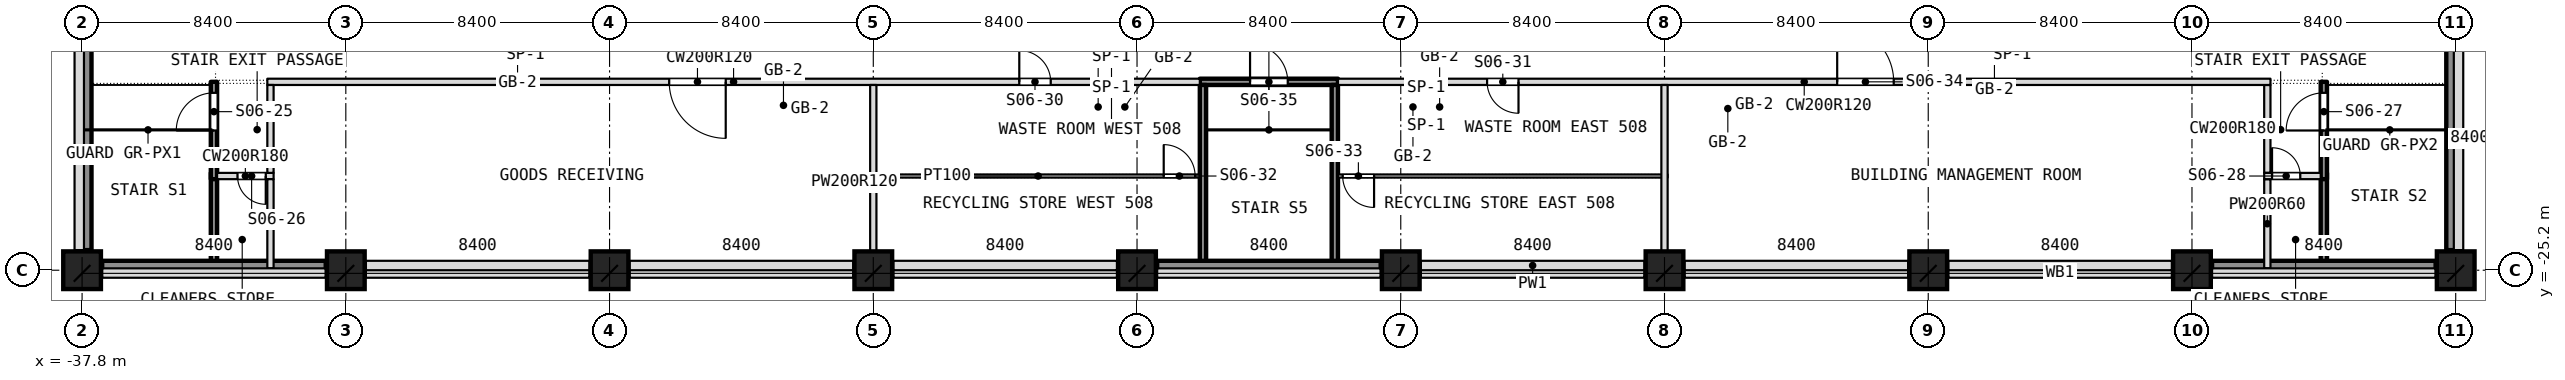
"""IFC4 building model, lengths in metres.
Left out: names, types, materials, properties, quantities, classifications, styles, units other than length and angle.
Written with IfcOpenShell. Run it as: python <this file> out.ifc"""

import sys

from ifc_helpers import new_model, si_unit, direction, frame, frame_2d, origin, origin_2d, place, context, subcontext, project, spatial, rectangle, extrude, element, fill, save


model = new_model("IFC4")
c1 = context("Model", 3, precision=1e-05, world=origin(), true_north=direction((0.0, 1.0)))
c2 = subcontext(c1, "Body", "Model", "MODEL_VIEW")
j1 = project(units=[si_unit("LENGTHUNIT", "METRE"), si_unit("PLANEANGLEUNIT", "RADIAN")], contexts=[c1])
p1 = place(None, origin())
s1 = spatial("IfcSite", under=j1, at=p1, CompositionType="ELEMENT")
p2 = place(p1, origin())
s2 = spatial("IfcBuilding", under=s1, at=p2, CompositionType="ELEMENT")
p3 = place(p2, frame((0.0, 0.0, 31.0)))
s3 = spatial("IfcBuildingStorey", under=s2, at=p3, CompositionType="ELEMENT", Elevation=31.0)
for number, where, z_axis, x_axis in (
    (1, (-37.8, -25.2, 0.0), (0.0, 0.0, 1.0), (1.0, 0.0, 0.0)),
    (2, (-29.4, -25.2, 0.0), (0.0, 0.0, 1.0), (1.0, 0.0, 0.0)),
    (3, (-21.0, -25.2, 0.0), (0.0, 0.0, 1.0), (1.0, 0.0, 0.0)),
    (4, (-12.6, -25.2, 0.0), (0.0, 0.0, 1.0), (1.0, 0.0, 0.0)),
    (5, (-4.2, -25.2, 0.0), (0.0, 0.0, 1.0), (1.0, 0.0, 0.0)),
    (6, (4.2, -25.2, 0.0), (0.0, 0.0, 1.0), (1.0, 0.0, 0.0)),
    (7, (12.6, -25.2, 0.0), (0.0, 0.0, 1.0), (1.0, 0.0, 0.0)),
    (8, (21.0, -25.2, 0.0), (0.0, 0.0, 1.0), (1.0, 0.0, 0.0)),
    (9, (29.4, -25.2, 0.0), (0.0, 0.0, 1.0), (1.0, 0.0, 0.0)),
    (10, (37.8, -25.2, 0.0), (0.0, 0.0, 1.0), (1.0, 0.0, 0.0)),
):
    element("IfcColumn", number, at=place(p3, frame(where, z_axis=z_axis, x_axis=x_axis)), inside=s3, PredefinedType="COLUMN", context=c2, shape_type="SweptSolid", body=[
        extrude(rectangle(XDim=1.2, YDim=1.2, at=origin_2d()), origin(), (0.0, 0.0, 1.0), 5.5),
    ])
p4 = place(p3, frame((33.6, -25.14, 0.0), z_axis=(0.0, 0.0, 1.0), x_axis=(0.0, 1.0, 0.0)))
e11 = element("IfcWall", 11, at=p4, inside=s3, PredefinedType="PARTITIONING", context=c2, shape_type="SweptSolid", body=[
    extrude(rectangle(XDim=3.04, YDim=0.2, at=frame_2d((1.52, 0.0))), origin(), (0.0, 0.0, 1.0), 5.35),
])
p5 = place(p3, frame((33.6, -22.3, 0.0), z_axis=(0.0, 0.0, 1.0), x_axis=(0.0, 1.0, 0.0)))
e12 = element("IfcWall", 12, at=p5, inside=s3, PredefinedType="PARTITIONING", context=c2, shape_type="SweptSolid", body=[
    extrude(rectangle(XDim=3.1, YDim=0.2, at=frame_2d((1.55, 0.0))), origin(), (0.0, 0.0, 1.0), 5.35),
])
p6 = place(p5, frame((1.55, 0.0, 0.0)))
e13 = element("IfcOpeningElement", 13, at=p6, cuts=e12, PredefinedType="OPENING", context=c2, shape_type="SweptSolid", body=[
    extrude(rectangle(XDim=1.2, YDim=2.1, at=frame_2d((0.6, 1.05))), frame((0.0, 0.1, 0.0), z_axis=(0.0, -1.0, 0.0), x_axis=(1.0, 0.0, 0.0)), (0.0, 0.0, 1.0), 0.2),
])
p7 = place(p3, frame((31.8, -25.14, 0.0), z_axis=(0.0, 0.0, 1.0), x_axis=(0.0, 1.0, 0.0)))
e14 = element("IfcWall", 14, at=p7, inside=s3, PredefinedType="PARTITIONING", context=c2, shape_type="SweptSolid", body=[
    extrude(rectangle(XDim=2.84, YDim=0.2, at=frame_2d((1.42, 0.0))), origin(), (0.0, 0.0, 1.0), 5.35),
])
p8 = place(p3, frame((31.8, -22.1, 0.0), z_axis=(0.0, 0.0, 1.0), x_axis=(0.0, 1.0, 0.0)))
e15 = element("IfcWall", 15, at=p8, inside=s3, PredefinedType="PARTITIONING", context=c2, shape_type="SweptSolid", body=[
    extrude(rectangle(XDim=2.8, YDim=0.2, at=frame_2d((1.4, 0.0))), origin(), (0.0, 0.0, 1.0), 5.35),
])
p9 = place(p3, frame((-33.5, -22.2, 0.0), z_axis=(0.0, 0.0, 1.0), x_axis=(1.0, 0.0, 0.0)))
e16 = element("IfcWall", 16, at=p9, inside=s3, PredefinedType="PARTITIONING", context=c2, shape_type="SweptSolid", body=[
    extrude(rectangle(XDim=1.8, YDim=0.2, at=frame_2d((0.9, 0.0))), origin(), (0.0, 0.0, 1.0), 5.35),
])
p10 = place(p9, frame((0.65, 0.0, 0.0)))
e17 = element("IfcOpeningElement", 17, at=p10, cuts=e16, PredefinedType="OPENING", context=c2, shape_type="SweptSolid", body=[
    extrude(rectangle(XDim=0.9, YDim=2.1, at=frame_2d((0.45, 1.05))), frame((0.0, 0.1, 0.0), z_axis=(0.0, -1.0, 0.0), x_axis=(1.0, 0.0, 0.0)), (0.0, 0.0, 1.0), 0.2),
])
p11 = place(p3, frame((31.7, -22.2, 0.0), z_axis=(0.0, 0.0, 1.0), x_axis=(1.0, 0.0, 0.0)))
e18 = element("IfcWall", 18, at=p11, inside=s3, PredefinedType="PARTITIONING", context=c2, shape_type="SweptSolid", body=[
    extrude(rectangle(XDim=1.8, YDim=0.2, at=frame_2d((0.9, 0.0))), origin(), (0.0, 0.0, 1.0), 5.35),
])
p12 = place(p11, frame((0.25, 0.0, 0.0)))
e19 = element("IfcOpeningElement", 19, at=p12, cuts=e18, PredefinedType="OPENING", context=c2, shape_type="SweptSolid", body=[
    extrude(rectangle(XDim=0.9, YDim=2.1, at=frame_2d((0.45, 1.05))), frame((0.0, 0.1, 0.0), z_axis=(0.0, -1.0, 0.0), x_axis=(1.0, 0.0, 0.0)), (0.0, 0.0, 1.0), 0.2),
])
p13 = place(p3, frame((-12.5, -22.2, 0.0), z_axis=(0.0, 0.0, 1.0), x_axis=(1.0, 0.0, 0.0)))
e20 = element("IfcWall", 20, at=p13, inside=s3, PredefinedType="PARTITIONING", context=c2, shape_type="SweptSolid", body=[
    extrude(rectangle(XDim=10.3, YDim=0.1, at=frame_2d((5.15, 0.0))), origin(), (0.0, 0.0, 1.0), 5.35),
])
p14 = place(p13, frame((9.15, 0.0, 0.0)))
e21 = element("IfcOpeningElement", 21, at=p14, cuts=e20, PredefinedType="OPENING", context=c2, shape_type="SweptSolid", body=[
    extrude(rectangle(XDim=1.0, YDim=2.1, at=frame_2d((0.5, 1.05))), frame((0.0, 0.05, 0.0), z_axis=(0.0, -1.0, 0.0), x_axis=(1.0, 0.0, 0.0)), (0.0, 0.0, 1.0), 0.1),
])
p15 = place(p3, frame((2.2, -22.2, 0.0), z_axis=(0.0, 0.0, 1.0), x_axis=(1.0, 0.0, 0.0)))
e22 = element("IfcWall", 22, at=p15, inside=s3, PredefinedType="PARTITIONING", context=c2, shape_type="SweptSolid", body=[
    extrude(rectangle(XDim=10.5, YDim=0.1, at=frame_2d((5.25, 0.0))), origin(), (0.0, 0.0, 1.0), 5.35),
])
p16 = place(p15, frame((0.15, 0.0, 0.0)))
e23 = element("IfcOpeningElement", 23, at=p16, cuts=e22, PredefinedType="OPENING", context=c2, shape_type="SweptSolid", body=[
    extrude(rectangle(XDim=1.0, YDim=2.1, at=frame_2d((0.5, 1.05))), frame((0.0, 0.05, 0.0), z_axis=(0.0, -1.0, 0.0), x_axis=(1.0, 0.0, 0.0)), (0.0, 0.0, 1.0), 0.1),
])
p17 = place(p3, frame((-31.9, -19.2, 0.0), z_axis=(0.0, 0.0, 1.0), x_axis=(1.0, 0.0, 0.0)))
e24 = element("IfcWall", 24, at=p17, inside=s3, PredefinedType="PARTITIONING", context=c2, shape_type="SweptSolid", body=[
    extrude(rectangle(XDim=29.7, YDim=0.2, at=frame_2d((14.85, 0.0))), origin(), (0.0, 0.0, 1.0), 3.7),
])
p18 = place(p17, frame((12.8, 0.0, 0.0)))
e25 = element("IfcOpeningElement", 25, at=p18, cuts=e24, PredefinedType="OPENING", context=c2, shape_type="SweptSolid", body=[
    extrude(rectangle(XDim=1.8, YDim=2.1, at=frame_2d((0.9, 1.05))), frame((0.0, 0.1, 0.0), z_axis=(0.0, -1.0, 0.0), x_axis=(1.0, 0.0, 0.0)), (0.0, 0.0, 1.0), 0.2),
])
p19 = place(p17, frame((23.95, 0.0, 0.0)))
e26 = element("IfcOpeningElement", 26, at=p19, cuts=e24, PredefinedType="OPENING", context=c2, shape_type="SweptSolid", body=[
    extrude(rectangle(XDim=1.0, YDim=2.1, at=frame_2d((0.5, 1.05))), frame((0.0, 0.1, 0.0), z_axis=(0.0, -1.0, 0.0), x_axis=(1.0, 0.0, 0.0)), (0.0, 0.0, 1.0), 0.2),
])
p20 = place(p3, frame((2.2, -19.2, 0.0), z_axis=(0.0, 0.0, 1.0), x_axis=(1.0, 0.0, 0.0)))
e27 = element("IfcWall", 27, at=p20, inside=s3, PredefinedType="PARTITIONING", context=c2, shape_type="SweptSolid", body=[
    extrude(rectangle(XDim=29.7, YDim=0.2, at=frame_2d((14.85, 0.0))), origin(), (0.0, 0.0, 1.0), 3.7),
])
p21 = place(p20, frame((4.75, 0.0, 0.0)))
e28 = element("IfcOpeningElement", 28, at=p21, cuts=e27, PredefinedType="OPENING", context=c2, shape_type="SweptSolid", body=[
    extrude(rectangle(XDim=1.0, YDim=2.1, at=frame_2d((0.5, 1.05))), frame((0.0, 0.1, 0.0), z_axis=(0.0, -1.0, 0.0), x_axis=(1.0, 0.0, 0.0)), (0.0, 0.0, 1.0), 0.2),
])
p22 = place(p20, frame((15.9, 0.0, 0.0)))
e29 = element("IfcOpeningElement", 29, at=p22, cuts=e27, PredefinedType="OPENING", context=c2, shape_type="SweptSolid", body=[
    extrude(rectangle(XDim=1.8, YDim=2.1, at=frame_2d((0.9, 1.05))), frame((0.0, 0.1, 0.0), z_axis=(0.0, -1.0, 0.0), x_axis=(1.0, 0.0, 0.0)), (0.0, 0.0, 1.0), 0.2),
])
p23 = place(p3, frame((-2.2, -19.2, 0.0), z_axis=(0.0, 0.0, 1.0), x_axis=(1.0, 0.0, 0.0)))
e30 = element("IfcWall", 30, at=p23, inside=s3, PredefinedType="PARTITIONING", context=c2, shape_type="SweptSolid", body=[
    extrude(rectangle(XDim=4.4, YDim=0.2, at=frame_2d((2.2, 0.0))), origin(), (0.0, 0.0, 1.0), 5.35),
])
p24 = place(p23, frame((1.6, 0.0, 0.0)))
e31 = element("IfcOpeningElement", 31, at=p24, cuts=e30, PredefinedType="OPENING", context=c2, shape_type="SweptSolid", body=[
    extrude(rectangle(XDim=1.2, YDim=2.1, at=frame_2d((0.6, 1.05))), frame((0.0, 0.1, 0.0), z_axis=(0.0, -1.0, 0.0), x_axis=(1.0, 0.0, 0.0)), (0.0, 0.0, 1.0), 0.2),
])
p25 = place(p3, frame((12.6, -25.5, 0.0), z_axis=(0.0, 0.0, 1.0), x_axis=(0.0, 1.0, 0.0)))
e32 = element("IfcWall", 32, at=p25, inside=s3, PredefinedType="PARTITIONING", context=c2, shape_type="SweptSolid", body=[
    extrude(rectangle(XDim=6.2, YDim=0.2, at=frame_2d((3.1, 0.0))), origin(), (0.0, 0.0, 1.0), 5.35),
])
for number, where, z_axis, x_axis in (
    (33, (2.1, -25.14, 0.0), (0.0, 0.0, 1.0), (0.0, 1.0, 0.0)),
    (34, (-2.1, -25.14, 0.0), (0.0, 0.0, 1.0), (0.0, 1.0, 0.0)),
):
    element("IfcWall", number, at=place(p3, frame(where, z_axis=z_axis, x_axis=x_axis)), inside=s3, PredefinedType="PARTITIONING", context=c2, shape_type="SweptSolid", body=[
        extrude(rectangle(XDim=5.84, YDim=0.2, at=frame_2d((2.92, 0.0))), origin(), (0.0, 0.0, 1.0), 5.35),
    ])
p26 = place(p3, frame((-12.6, -25.5, 0.0), z_axis=(0.0, 0.0, 1.0), x_axis=(0.0, 1.0, 0.0)))
e35 = element("IfcWall", 35, at=p26, inside=s3, PredefinedType="PARTITIONING", context=c2, shape_type="SweptSolid", body=[
    extrude(rectangle(XDim=6.2, YDim=0.2, at=frame_2d((3.1, 0.0))), origin(), (0.0, 0.0, 1.0), 5.35),
])
p27 = place(p3, frame((-31.8, -25.14, 0.0), z_axis=(0.0, 0.0, 1.0), x_axis=(0.0, 1.0, 0.0)))
e36 = element("IfcWall", 36, at=p27, inside=s3, PredefinedType="PARTITIONING", context=c2, shape_type="SweptSolid", body=[
    extrude(rectangle(XDim=2.84, YDim=0.2, at=frame_2d((1.42, 0.0))), origin(), (0.0, 0.0, 1.0), 5.35),
])
p28 = place(p3, frame((-31.8, -22.1, 0.0), z_axis=(0.0, 0.0, 1.0), x_axis=(0.0, 1.0, 0.0)))
e37 = element("IfcWall", 37, at=p28, inside=s3, PredefinedType="PARTITIONING", context=c2, shape_type="SweptSolid", body=[
    extrude(rectangle(XDim=2.8, YDim=0.2, at=frame_2d((1.4, 0.0))), origin(), (0.0, 0.0, 1.0), 5.35),
])
p29 = place(p3, frame((-33.6, -25.14, 0.0), z_axis=(0.0, 0.0, 1.0), x_axis=(0.0, 1.0, 0.0)))
e38 = element("IfcWall", 38, at=p29, inside=s3, PredefinedType="PARTITIONING", context=c2, shape_type="SweptSolid", body=[
    extrude(rectangle(XDim=3.04, YDim=0.2, at=frame_2d((1.52, 0.0))), origin(), (0.0, 0.0, 1.0), 5.35),
])
p30 = place(p3, frame((-33.6, -22.3, 0.0), z_axis=(0.0, 0.0, 1.0), x_axis=(0.0, 1.0, 0.0)))
e39 = element("IfcWall", 39, at=p30, inside=s3, PredefinedType="PARTITIONING", context=c2, shape_type="SweptSolid", body=[
    extrude(rectangle(XDim=3.1, YDim=0.2, at=frame_2d((1.55, 0.0))), origin(), (0.0, 0.0, 1.0), 5.35),
])
p31 = place(p30, frame((1.55, 0.0, 0.0)))
e40 = element("IfcOpeningElement", 40, at=p31, cuts=e39, PredefinedType="OPENING", context=c2, shape_type="SweptSolid", body=[
    extrude(rectangle(XDim=1.2, YDim=2.1, at=frame_2d((0.6, 1.05))), frame((0.0, 0.1, 0.0), z_axis=(0.0, -1.0, 0.0), x_axis=(1.0, 0.0, 0.0)), (0.0, 0.0, 1.0), 0.2),
])
p32 = place(p3, frame((-37.16, -25.29, 0.0), z_axis=(0.0, 0.0, 1.0), x_axis=(1.0, 0.0, 0.0)))
e41 = element("IfcWall", 41, at=p32, inside=s3, PredefinedType="NOTDEFINED", context=c2, shape_type="SweptSolid", body=[
    extrude(rectangle(XDim=7.12, YDim=0.3, at=frame_2d((3.56, 0.0))), origin(), (0.0, 0.0, 1.0), 4.18),
])
for number, where, z_axis, x_axis in (
    (42, (-28.76, -25.29, 0.0), (0.0, 0.0, 1.0), (1.0, 0.0, 0.0)),
    (43, (-20.36, -25.29, 0.0), (0.0, 0.0, 1.0), (1.0, 0.0, 0.0)),
):
    element("IfcWall", number, at=place(p3, frame(where, z_axis=z_axis, x_axis=x_axis)), inside=s3, PredefinedType="NOTDEFINED", context=c2, shape_type="SweptSolid", body=[
        extrude(rectangle(XDim=7.12, YDim=0.3, at=frame_2d((3.56, 0.0))), origin(), (0.0, 0.0, 1.0), 4.18),
    ])
p33 = place(p3, frame((-11.96, -25.29, 0.0), z_axis=(0.0, 0.0, 1.0), x_axis=(1.0, 0.0, 0.0)))
e44 = element("IfcWall", 44, at=p33, inside=s3, PredefinedType="NOTDEFINED", context=c2, shape_type="SweptSolid", body=[
    extrude(rectangle(XDim=7.12, YDim=0.3, at=frame_2d((3.56, 0.0))), origin(), (0.0, 0.0, 1.0), 4.18),
])
p34 = place(p3, frame((-3.56, -25.29, 0.0), z_axis=(0.0, 0.0, 1.0), x_axis=(1.0, 0.0, 0.0)))
e45 = element("IfcWall", 45, at=p34, inside=s3, PredefinedType="NOTDEFINED", context=c2, shape_type="SweptSolid", body=[
    extrude(rectangle(XDim=7.12, YDim=0.3, at=frame_2d((3.56, 0.0))), origin(), (0.0, 0.0, 1.0), 4.18),
])
p35 = place(p3, frame((4.84, -25.29, 0.0), z_axis=(0.0, 0.0, 1.0), x_axis=(1.0, 0.0, 0.0)))
e46 = element("IfcWall", 46, at=p35, inside=s3, PredefinedType="NOTDEFINED", context=c2, shape_type="SweptSolid", body=[
    extrude(rectangle(XDim=7.12, YDim=0.3, at=frame_2d((3.56, 0.0))), origin(), (0.0, 0.0, 1.0), 4.18),
])
for number, where, z_axis, x_axis in (
    (47, (13.24, -25.29, 0.0), (0.0, 0.0, 1.0), (1.0, 0.0, 0.0)),
    (48, (21.64, -25.29, 0.0), (0.0, 0.0, 1.0), (1.0, 0.0, 0.0)),
):
    element("IfcWall", number, at=place(p3, frame(where, z_axis=z_axis, x_axis=x_axis)), inside=s3, PredefinedType="NOTDEFINED", context=c2, shape_type="SweptSolid", body=[
        extrude(rectangle(XDim=7.12, YDim=0.3, at=frame_2d((3.56, 0.0))), origin(), (0.0, 0.0, 1.0), 4.18),
    ])
p36 = place(p3, frame((30.04, -25.29, 0.0), z_axis=(0.0, 0.0, 1.0), x_axis=(1.0, 0.0, 0.0)))
e49 = element("IfcWall", 49, at=p36, inside=s3, PredefinedType="NOTDEFINED", context=c2, shape_type="SweptSolid", body=[
    extrude(rectangle(XDim=7.12, YDim=0.3, at=frame_2d((3.56, 0.0))), origin(), (0.0, 0.0, 1.0), 4.18),
])
for number, where, z_axis, x_axis in (
    (50, (37.89, -24.56, 0.0), (0.0, 0.0, 1.0), (0.0, 1.0, 0.0)),
    (51, (-37.89, -17.44, 0.0), (0.0, 0.0, 1.0), (0.0, -1.0, 0.0)),
):
    element("IfcWall", number, at=place(p3, frame(where, z_axis=z_axis, x_axis=x_axis)), inside=s3, PredefinedType="NOTDEFINED", context=c2, shape_type="SweptSolid", body=[
        extrude(rectangle(XDim=7.12, YDim=0.3, at=frame_2d((3.56, 0.0))), origin(), (0.0, 0.0, 1.0), 4.18),
    ])
for number, where, z_axis, x_axis in (
    (52, (-37.65, -24.56, 5.5), (0.0, 0.0, 1.0), (0.0, 1.0, 0.0)),
    (53, (37.65, -17.44, 5.5), (0.0, 0.0, 1.0), (0.0, -1.0, 0.0)),
):
    element("IfcWall", number, at=place(p3, frame(where, z_axis=z_axis, x_axis=x_axis)), inside=s3, PredefinedType="PARAPET", context=c2, shape_type="SweptSolid", body=[
        extrude(rectangle(XDim=7.12, YDim=0.3, at=frame_2d((3.56, 0.0))), origin(), (0.0, 0.0, 1.0), 1.1),
    ])
p37 = place(p3, frame((37.16, -25.05, 5.5), z_axis=(0.0, 0.0, 1.0), x_axis=(-1.0, 0.0, 0.0)))
e54 = element("IfcWall", 54, at=p37, inside=s3, PredefinedType="PARAPET", context=c2, shape_type="SweptSolid", body=[
    extrude(rectangle(XDim=7.12, YDim=0.3, at=frame_2d((3.56, 0.0))), origin(), (0.0, 0.0, 1.0), 1.1),
])
for number, where, z_axis, x_axis in (
    (55, (28.76, -25.05, 5.5), (0.0, 0.0, 1.0), (-1.0, 0.0, 0.0)),
    (56, (20.36, -25.05, 5.5), (0.0, 0.0, 1.0), (-1.0, 0.0, 0.0)),
):
    element("IfcWall", number, at=place(p3, frame(where, z_axis=z_axis, x_axis=x_axis)), inside=s3, PredefinedType="PARAPET", context=c2, shape_type="SweptSolid", body=[
        extrude(rectangle(XDim=7.12, YDim=0.3, at=frame_2d((3.56, 0.0))), origin(), (0.0, 0.0, 1.0), 1.1),
    ])
p38 = place(p3, frame((11.96, -25.05, 5.5), z_axis=(0.0, 0.0, 1.0), x_axis=(-1.0, 0.0, 0.0)))
e57 = element("IfcWall", 57, at=p38, inside=s3, PredefinedType="PARAPET", context=c2, shape_type="SweptSolid", body=[
    extrude(rectangle(XDim=7.12, YDim=0.3, at=frame_2d((3.56, 0.0))), origin(), (0.0, 0.0, 1.0), 1.1),
])
p39 = place(p3, frame((3.56, -25.05, 5.5), z_axis=(0.0, 0.0, 1.0), x_axis=(-1.0, 0.0, 0.0)))
e58 = element("IfcWall", 58, at=p39, inside=s3, PredefinedType="PARAPET", context=c2, shape_type="SweptSolid", body=[
    extrude(rectangle(XDim=7.12, YDim=0.3, at=frame_2d((3.56, 0.0))), origin(), (0.0, 0.0, 1.0), 1.1),
])
p40 = place(p3, frame((-4.84, -25.05, 5.5), z_axis=(0.0, 0.0, 1.0), x_axis=(-1.0, 0.0, 0.0)))
e59 = element("IfcWall", 59, at=p40, inside=s3, PredefinedType="PARAPET", context=c2, shape_type="SweptSolid", body=[
    extrude(rectangle(XDim=7.12, YDim=0.3, at=frame_2d((3.56, 0.0))), origin(), (0.0, 0.0, 1.0), 1.1),
])
for number, where, z_axis, x_axis in (
    (60, (-13.24, -25.05, 5.5), (0.0, 0.0, 1.0), (-1.0, 0.0, 0.0)),
    (61, (-21.64, -25.05, 5.5), (0.0, 0.0, 1.0), (-1.0, 0.0, 0.0)),
):
    element("IfcWall", number, at=place(p3, frame(where, z_axis=z_axis, x_axis=x_axis)), inside=s3, PredefinedType="PARAPET", context=c2, shape_type="SweptSolid", body=[
        extrude(rectangle(XDim=7.12, YDim=0.3, at=frame_2d((3.56, 0.0))), origin(), (0.0, 0.0, 1.0), 1.1),
    ])
p41 = place(p3, frame((-30.04, -25.05, 5.5), z_axis=(0.0, 0.0, 1.0), x_axis=(-1.0, 0.0, 0.0)))
e62 = element("IfcWall", 62, at=p41, inside=s3, PredefinedType="PARAPET", context=c2, shape_type="SweptSolid", body=[
    extrude(rectangle(XDim=7.12, YDim=0.3, at=frame_2d((3.56, 0.0))), origin(), (0.0, 0.0, 1.0), 1.1),
])
p42 = place(p31, origin())
e63 = element("IfcDoor", 63, at=p42, inside=s3, OperationType="SINGLE_SWING_RIGHT", PredefinedType="DOOR", context=c2, shape_type="SweptSolid", body=[
    extrude(rectangle(XDim=1.2, YDim=2.1, at=frame_2d((0.6, 1.05))), frame((0.0, 0.025, 0.0), z_axis=(0.0, -1.0, 0.0), x_axis=(1.0, 0.0, 0.0)), (0.0, 0.0, 1.0), 0.05),
])
fill(e40, e63)
p43 = place(p10, origin())
e64 = element("IfcDoor", 64, at=p43, inside=s3, OperationType="SINGLE_SWING_LEFT", PredefinedType="DOOR", context=c2, shape_type="SweptSolid", body=[
    extrude(rectangle(XDim=0.9, YDim=2.1, at=frame_2d((0.45, 1.05))), frame((0.0, 0.025, 0.0), z_axis=(0.0, -1.0, 0.0), x_axis=(1.0, 0.0, 0.0)), (0.0, 0.0, 1.0), 0.05),
])
fill(e17, e64)
p44 = place(p6, origin())
e65 = element("IfcDoor", 65, at=p44, inside=s3, OperationType="SINGLE_SWING_LEFT", PredefinedType="DOOR", context=c2, shape_type="SweptSolid", body=[
    extrude(rectangle(XDim=1.2, YDim=2.1, at=frame_2d((0.6, 1.05))), frame((0.0, 0.025, 0.0), z_axis=(0.0, -1.0, 0.0), x_axis=(1.0, 0.0, 0.0)), (0.0, 0.0, 1.0), 0.05),
])
fill(e13, e65)
p45 = place(p12, origin())
e66 = element("IfcDoor", 66, at=p45, inside=s3, OperationType="SINGLE_SWING_RIGHT", PredefinedType="DOOR", context=c2, shape_type="SweptSolid", body=[
    extrude(rectangle(XDim=0.9, YDim=2.1, at=frame_2d((0.45, 1.05))), frame((0.0, 0.025, 0.0), z_axis=(0.0, -1.0, 0.0), x_axis=(1.0, 0.0, 0.0)), (0.0, 0.0, 1.0), 0.05),
])
fill(e19, e66)
p46 = place(p18, origin())
e67 = element("IfcDoor", 67, at=p46, inside=s3, OperationType="DOUBLE_DOOR_SINGLE_SWING", PredefinedType="DOOR", context=c2, shape_type="SweptSolid", body=[
    extrude(rectangle(XDim=1.8, YDim=2.1, at=frame_2d((0.9, 1.05))), frame((0.0, 0.025, 0.0), z_axis=(0.0, -1.0, 0.0), x_axis=(1.0, 0.0, 0.0)), (0.0, 0.0, 1.0), 0.05),
])
fill(e25, e67)
p47 = place(p19, origin())
e68 = element("IfcDoor", 68, at=p47, inside=s3, OperationType="SINGLE_SWING_RIGHT", PredefinedType="DOOR", context=c2, shape_type="SweptSolid", body=[
    extrude(rectangle(XDim=1.0, YDim=2.1, at=frame_2d((0.5, 1.05))), frame((0.0, 0.025, 0.0), z_axis=(0.0, -1.0, 0.0), x_axis=(1.0, 0.0, 0.0)), (0.0, 0.0, 1.0), 0.05),
])
fill(e26, e68)
p48 = place(p21, origin())
e69 = element("IfcDoor", 69, at=p48, inside=s3, OperationType="SINGLE_SWING_LEFT", PredefinedType="DOOR", context=c2, shape_type="SweptSolid", body=[
    extrude(rectangle(XDim=1.0, YDim=2.1, at=frame_2d((0.5, 1.05))), frame((0.0, 0.025, 0.0), z_axis=(0.0, -1.0, 0.0), x_axis=(1.0, 0.0, 0.0)), (0.0, 0.0, 1.0), 0.05),
])
fill(e28, e69)
p49 = place(p14, origin())
e70 = element("IfcDoor", 70, at=p49, inside=s3, OperationType="SINGLE_SWING_LEFT", PredefinedType="DOOR", context=c2, shape_type="SweptSolid", body=[
    extrude(rectangle(XDim=1.0, YDim=2.1, at=frame_2d((0.5, 1.05))), frame((0.0, 0.025, 0.0), z_axis=(0.0, -1.0, 0.0), x_axis=(1.0, 0.0, 0.0)), (0.0, 0.0, 1.0), 0.05),
])
fill(e21, e70)
p50 = place(p16, origin())
e71 = element("IfcDoor", 71, at=p50, inside=s3, OperationType="SINGLE_SWING_RIGHT", PredefinedType="DOOR", context=c2, shape_type="SweptSolid", body=[
    extrude(rectangle(XDim=1.0, YDim=2.1, at=frame_2d((0.5, 1.05))), frame((0.0, 0.025, 0.0), z_axis=(0.0, -1.0, 0.0), x_axis=(1.0, 0.0, 0.0)), (0.0, 0.0, 1.0), 0.05),
])
fill(e23, e71)
p51 = place(p22, origin())
e72 = element("IfcDoor", 72, at=p51, inside=s3, OperationType="DOUBLE_DOOR_SINGLE_SWING", PredefinedType="DOOR", context=c2, shape_type="SweptSolid", body=[
    extrude(rectangle(XDim=1.8, YDim=2.1, at=frame_2d((0.9, 1.05))), frame((0.0, 0.025, 0.0), z_axis=(0.0, -1.0, 0.0), x_axis=(1.0, 0.0, 0.0)), (0.0, 0.0, 1.0), 0.05),
])
fill(e29, e72)
p52 = place(p24, origin())
e73 = element("IfcDoor", 73, at=p52, inside=s3, OperationType="SINGLE_SWING_LEFT", PredefinedType="DOOR", context=c2, shape_type="SweptSolid", body=[
    extrude(rectangle(XDim=1.2, YDim=2.1, at=frame_2d((0.6, 1.05))), frame((0.0, 0.025, 0.0), z_axis=(0.0, -1.0, 0.0), x_axis=(1.0, 0.0, 0.0)), (0.0, 0.0, 1.0), 0.05),
])
fill(e31, e73)
save(model, sys.argv[1])
